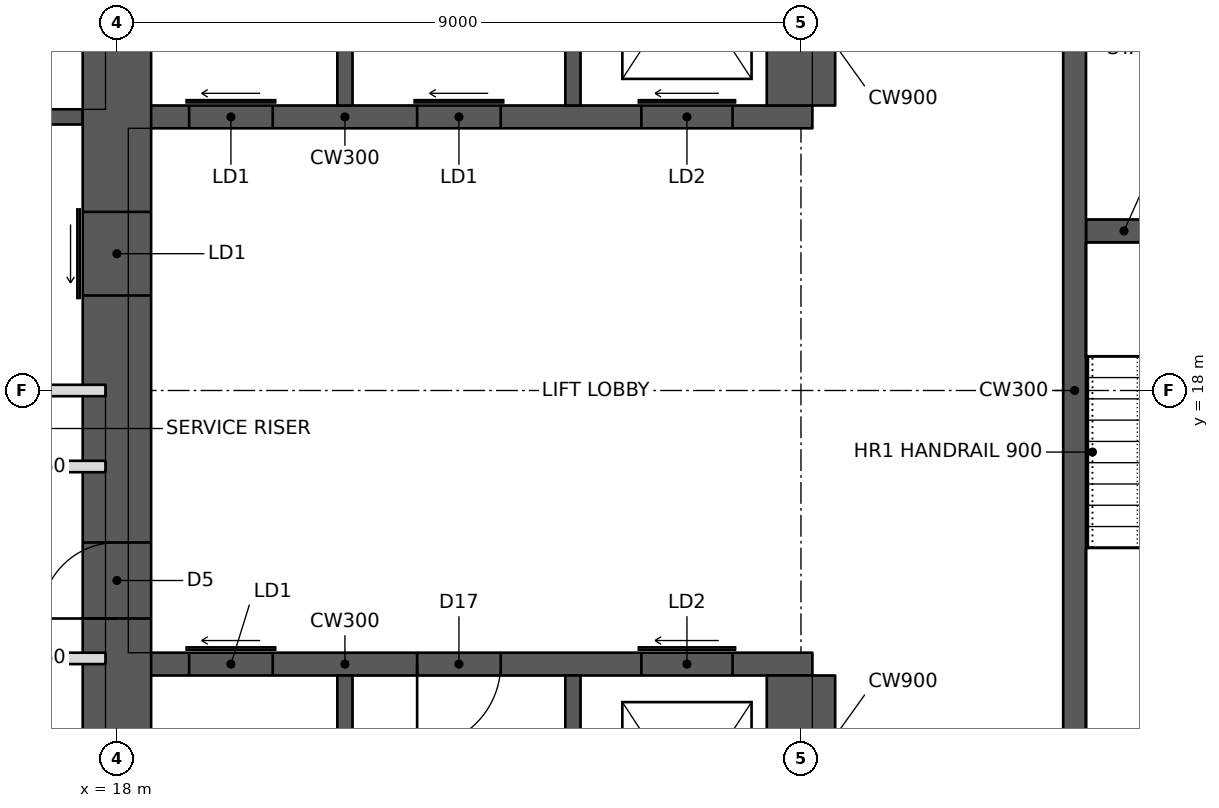
"""IFC4 building model, lengths in metres.
Left out: names, types, materials, properties, quantities, classifications, styles, units other than length and angle.
Written with IfcOpenShell. Run it as: python <this file> out.ifc"""

import sys

from ifc_helpers import new_model, si_unit, direction, frame, frame_2d, origin, place, context, subcontext, project, spatial, rectangle, extrude, element, fill, save


model = new_model("IFC4")
c1 = context("Model", 3, precision=1e-05, world=origin(), true_north=direction((0.0, 1.0)))
c2 = subcontext(c1, "Body", "Model", "MODEL_VIEW")
j1 = project(units=[si_unit("LENGTHUNIT", "METRE"), si_unit("PLANEANGLEUNIT", "RADIAN")], contexts=[c1])
p1 = place(None, origin())
s1 = spatial("IfcSite", under=j1, at=p1, CompositionType="ELEMENT")
p2 = place(p1, origin())
s2 = spatial("IfcBuilding", under=s1, at=p2, CompositionType="ELEMENT")
p3 = place(p2, frame((0.0, 0.0, 160.4)))
s3 = spatial("IfcBuildingStorey", under=s2, at=p3, CompositionType="ELEMENT", Elevation=160.4)
p4 = place(p3, frame((18.0, 11.4, 0.0), z_axis=(0.0, 0.0, 1.0), x_axis=(0.0, 1.0, 0.0)))
e1 = element("IfcWall", 1, at=p4, inside=s3, PredefinedType="SHEAR", context=c2, shape_type="SweptSolid", body=[
    extrude(rectangle(XDim=13.2, YDim=0.9, at=frame_2d((6.6, 0.0))), origin(), (0.0, 0.0, 1.0), 3.4),
])
p5 = place(p4, frame((3.6, 0.0, 0.0)))
e2 = element("IfcOpeningElement", 2, at=p5, cuts=e1, PredefinedType="OPENING", context=c2, shape_type="SweptSolid", body=[
    extrude(rectangle(XDim=1.0, YDim=2.1, at=frame_2d((0.5, 1.05))), frame((0.0, 0.46, 0.0), z_axis=(0.0, -1.0, 0.0), x_axis=(1.0, 0.0, 0.0)), (0.0, 0.0, 1.0), 0.92),
])
p6 = place(p4, frame((7.85, 0.0, 0.0)))
e3 = element("IfcOpeningElement", 3, at=p6, cuts=e1, PredefinedType="OPENING", context=c2, shape_type="SweptSolid", body=[
    extrude(rectangle(XDim=1.1, YDim=2.1, at=frame_2d((0.55, 1.05))), frame((0.0, 0.46, 0.0), z_axis=(0.0, -1.0, 0.0), x_axis=(1.0, 0.0, 0.0)), (0.0, 0.0, 1.0), 0.92),
])
p7 = place(p3, frame((14.55, 18.0, 0.0), z_axis=(0.0, 0.0, 1.0), x_axis=(1.0, 0.0, 0.0)))
e4 = element("IfcWall", 4, at=p7, inside=s3, PredefinedType="PARTITIONING", context=c2, shape_type="SweptSolid", body=[
    extrude(rectangle(XDim=3.3, YDim=0.15, at=frame_2d((1.65, 0.0))), origin(), (0.0, 0.0, 1.0), 3.2),
])
p8 = place(p3, frame((18.15, 14.4, 0.0), z_axis=(0.0, 0.0, 1.0), x_axis=(1.0, 0.0, 0.0)))
e5 = element("IfcWall", 5, at=p8, inside=s3, PredefinedType="SHEAR", context=c2, shape_type="SweptSolid", body=[
    extrude(rectangle(XDim=9.0, YDim=0.3, at=frame_2d((4.5, 0.0))), origin(), (0.0, 0.0, 1.0), 3.4),
])
p9 = place(p8, frame((0.8, 0.0, 0.0)))
e6 = element("IfcOpeningElement", 6, at=p9, cuts=e5, PredefinedType="OPENING", context=c2, shape_type="SweptSolid", body=[
    extrude(rectangle(XDim=1.1, YDim=2.1, at=frame_2d((0.55, 1.05))), frame((0.0, 0.16, 0.0), z_axis=(0.0, -1.0, 0.0), x_axis=(1.0, 0.0, 0.0)), (0.0, 0.0, 1.0), 0.32),
])
p10 = place(p8, frame((6.75, 0.0, 0.0)))
e7 = element("IfcOpeningElement", 7, at=p10, cuts=e5, PredefinedType="OPENING", context=c2, shape_type="SweptSolid", body=[
    extrude(rectangle(XDim=1.2, YDim=2.1, at=frame_2d((0.6, 1.05))), frame((0.0, 0.16, 0.0), z_axis=(0.0, -1.0, 0.0), x_axis=(1.0, 0.0, 0.0)), (0.0, 0.0, 1.0), 0.32),
])
p11 = place(p8, frame((3.8, 0.0, 0.0)))
e8 = element("IfcOpeningElement", 8, at=p11, cuts=e5, PredefinedType="OPENING", context=c2, shape_type="SweptSolid", body=[
    extrude(rectangle(XDim=1.1, YDim=2.1, at=frame_2d((0.55, 1.05))), frame((0.0, 0.16, 0.0), z_axis=(0.0, -1.0, 0.0), x_axis=(1.0, 0.0, 0.0)), (0.0, 0.0, 1.0), 0.32),
])
p12 = place(p3, frame((27.0, 11.4, 0.0), z_axis=(0.0, 0.0, 1.0), x_axis=(0.0, 1.0, 0.0)))
e9 = element("IfcWall", 9, at=p12, inside=s3, PredefinedType="SHEAR", context=c2, shape_type="SweptSolid", body=[
    extrude(rectangle(XDim=2.85, YDim=0.9, at=frame_2d((1.425, 0.0))), origin(), (0.0, 0.0, 1.0), 3.4),
])
for number, where, z_axis, x_axis in (
    (10, (21.0, 11.4, 0.0), (0.0, 0.0, 1.0), (0.0, 1.0, 0.0)),
    (11, (24.0, 11.4, 0.0), (0.0, 0.0, 1.0), (0.0, 1.0, 0.0)),
):
    element("IfcWall", number, at=place(p3, frame(where, z_axis=z_axis, x_axis=x_axis)), inside=s3, PredefinedType="SHEAR", context=c2, shape_type="SweptSolid", body=[
        extrude(rectangle(XDim=2.85, YDim=0.2, at=frame_2d((1.425, 0.0))), origin(), (0.0, 0.0, 1.0), 3.4),
    ])
p13 = place(p3, frame((18.15, 21.6, 0.0), z_axis=(0.0, 0.0, 1.0), x_axis=(1.0, 0.0, 0.0)))
e12 = element("IfcWall", 12, at=p13, inside=s3, PredefinedType="SHEAR", context=c2, shape_type="SweptSolid", body=[
    extrude(rectangle(XDim=9.0, YDim=0.3, at=frame_2d((4.5, 0.0))), origin(), (0.0, 0.0, 1.0), 3.4),
])
p14 = place(p13, frame((0.8, 0.0, 0.0)))
e13 = element("IfcOpeningElement", 13, at=p14, cuts=e12, PredefinedType="OPENING", context=c2, shape_type="SweptSolid", body=[
    extrude(rectangle(XDim=1.1, YDim=2.1, at=frame_2d((0.55, 1.05))), frame((0.0, 0.16, 0.0), z_axis=(0.0, -1.0, 0.0), x_axis=(1.0, 0.0, 0.0)), (0.0, 0.0, 1.0), 0.32),
])
p15 = place(p13, frame((3.8, 0.0, 0.0)))
e14 = element("IfcOpeningElement", 14, at=p15, cuts=e12, PredefinedType="OPENING", context=c2, shape_type="SweptSolid", body=[
    extrude(rectangle(XDim=1.1, YDim=2.1, at=frame_2d((0.55, 1.05))), frame((0.0, 0.16, 0.0), z_axis=(0.0, -1.0, 0.0), x_axis=(1.0, 0.0, 0.0)), (0.0, 0.0, 1.0), 0.32),
])
p16 = place(p13, frame((6.75, 0.0, 0.0)))
e15 = element("IfcOpeningElement", 15, at=p16, cuts=e12, PredefinedType="OPENING", context=c2, shape_type="SweptSolid", body=[
    extrude(rectangle(XDim=1.2, YDim=2.1, at=frame_2d((0.6, 1.05))), frame((0.0, 0.16, 0.0), z_axis=(0.0, -1.0, 0.0), x_axis=(1.0, 0.0, 0.0)), (0.0, 0.0, 1.0), 0.32),
])
p17 = place(p3, frame((27.0, 21.75, 0.0), z_axis=(0.0, 0.0, 1.0), x_axis=(0.0, 1.0, 0.0)))
e16 = element("IfcWall", 16, at=p17, inside=s3, PredefinedType="SHEAR", context=c2, shape_type="SweptSolid", body=[
    extrude(rectangle(XDim=2.85, YDim=0.9, at=frame_2d((1.425, 0.0))), origin(), (0.0, 0.0, 1.0), 3.4),
])
for number, where, z_axis, x_axis in (
    (17, (21.0, 21.75, 0.0), (0.0, 0.0, 1.0), (0.0, 1.0, 0.0)),
    (18, (24.0, 21.75, 0.0), (0.0, 0.0, 1.0), (0.0, 1.0, 0.0)),
):
    element("IfcWall", number, at=place(p3, frame(where, z_axis=z_axis, x_axis=x_axis)), inside=s3, PredefinedType="SHEAR", context=c2, shape_type="SweptSolid", body=[
        extrude(rectangle(XDim=2.85, YDim=0.2, at=frame_2d((1.425, 0.0))), origin(), (0.0, 0.0, 1.0), 3.4),
    ])
p18 = place(p3, frame((30.6, 11.4, 0.0), z_axis=(0.0, 0.0, 1.0), x_axis=(0.0, 1.0, 0.0)))
e19 = element("IfcWall", 19, at=p18, inside=s3, PredefinedType="SHEAR", context=c2, shape_type="SweptSolid", body=[
    extrude(rectangle(XDim=13.2, YDim=0.3, at=frame_2d((6.6, 0.0))), origin(), (0.0, 0.0, 1.0), 3.4),
])
p19 = place(p3, frame((30.75, 20.1, 0.0), z_axis=(0.0, 0.0, 1.0), x_axis=(1.0, 0.0, 0.0)))
e20 = element("IfcWall", 20, at=p19, inside=s3, PredefinedType="SHEAR", context=c2, shape_type="SweptSolid", body=[
    extrude(rectangle(XDim=2.85, YDim=0.3, at=frame_2d((1.425, 0.0))), origin(), (0.0, 0.0, 1.0), 3.4),
])
p20 = place(p19, frame((1.15, 0.0, 0.0)))
e21 = element("IfcOpeningElement", 21, at=p20, cuts=e20, PredefinedType="OPENING", context=c2, shape_type="SweptSolid", body=[
    extrude(rectangle(XDim=1.0, YDim=2.1, at=frame_2d((0.5, 1.05))), frame((0.0, 0.16, 0.0), z_axis=(0.0, -1.0, 0.0), x_axis=(1.0, 0.0, 0.0)), (0.0, 0.0, 1.0), 0.32),
])
p21 = place(p3, frame((14.55, 21.6, 0.0), z_axis=(0.0, 0.0, 1.0), x_axis=(1.0, 0.0, 0.0)))
e22 = element("IfcWall", 22, at=p21, inside=s3, PredefinedType="SHEAR", context=c2, shape_type="SweptSolid", body=[
    extrude(rectangle(XDim=3.0, YDim=0.2, at=frame_2d((1.5, 0.0))), origin(), (0.0, 0.0, 1.0), 3.4),
])
p22 = place(p3, frame((14.55, 17.0, 0.0), z_axis=(0.0, 0.0, 1.0), x_axis=(1.0, 0.0, 0.0)))
e23 = element("IfcWall", 23, at=p22, inside=s3, PredefinedType="PARTITIONING", context=c2, shape_type="SweptSolid", body=[
    extrude(rectangle(XDim=3.3, YDim=0.15, at=frame_2d((1.65, 0.0))), origin(), (0.0, 0.0, 1.0), 3.2),
])
p23 = place(p22, frame((0.3, 0.0, 0.0)))
e24 = element("IfcOpeningElement", 24, at=p23, cuts=e23, PredefinedType="OPENING", context=c2, shape_type="SweptSolid", body=[
    extrude(rectangle(XDim=1.0, YDim=2.1, at=frame_2d((0.5, 1.05))), frame((0.0, 0.085, 0.0), z_axis=(0.0, -1.0, 0.0), x_axis=(1.0, 0.0, 0.0)), (0.0, 0.0, 1.0), 0.17),
])
p24 = place(p3, frame((14.55, 14.475, 0.0), z_axis=(0.0, 0.0, 1.0), x_axis=(1.0, 0.0, 0.0)))
e25 = element("IfcWall", 25, at=p24, inside=s3, PredefinedType="PARTITIONING", context=c2, shape_type="SweptSolid", body=[
    extrude(rectangle(XDim=3.3, YDim=0.15, at=frame_2d((1.65, 0.0))), origin(), (0.0, 0.0, 1.0), 3.2),
])
p25 = place(p24, frame((0.3, 0.0, 0.0)))
e26 = element("IfcOpeningElement", 26, at=p25, cuts=e25, PredefinedType="OPENING", context=c2, shape_type="SweptSolid", body=[
    extrude(rectangle(XDim=1.0, YDim=2.1, at=frame_2d((0.5, 1.05))), frame((0.0, 0.085, 0.0), z_axis=(0.0, -1.0, 0.0), x_axis=(1.0, 0.0, 0.0)), (0.0, 0.0, 1.0), 0.17),
])
p26 = place(p5, origin())
e27 = element("IfcDoor", 27, at=p26, inside=s3, OperationType="SINGLE_SWING_LEFT", PredefinedType="DOOR", context=c2, shape_type="SweptSolid", body=[
    extrude(rectangle(XDim=1.0, YDim=2.1, at=frame_2d((0.5, 1.05))), frame((0.0, 0.025, 0.0), z_axis=(0.0, -1.0, 0.0), x_axis=(1.0, 0.0, 0.0)), (0.0, 0.0, 1.0), 0.05),
])
fill(e2, e27)
p27 = place(p9, origin())
e28 = element("IfcDoor", 28, at=p27, inside=s3, OperationType="SLIDING_TO_LEFT", PredefinedType="DOOR", context=c2, shape_type="SweptSolid", body=[
    extrude(rectangle(XDim=1.1, YDim=2.1, at=frame_2d((0.55, 1.05))), frame((0.0, 0.025, 0.0), z_axis=(0.0, -1.0, 0.0), x_axis=(1.0, 0.0, 0.0)), (0.0, 0.0, 1.0), 0.05),
])
fill(e6, e28)
p28 = place(p6, origin())
e29 = element("IfcDoor", 29, at=p28, inside=s3, OperationType="SLIDING_TO_LEFT", PredefinedType="DOOR", context=c2, shape_type="SweptSolid", body=[
    extrude(rectangle(XDim=1.1, YDim=2.1, at=frame_2d((0.55, 1.05))), frame((0.0, 0.025, 0.0), z_axis=(0.0, -1.0, 0.0), x_axis=(1.0, 0.0, 0.0)), (0.0, 0.0, 1.0), 0.05),
])
fill(e3, e29)
p29 = place(p14, origin())
e30 = element("IfcDoor", 30, at=p29, inside=s3, OperationType="SLIDING_TO_LEFT", PredefinedType="DOOR", context=c2, shape_type="SweptSolid", body=[
    extrude(rectangle(XDim=1.1, YDim=2.1, at=frame_2d((0.55, 1.05))), frame((0.0, 0.025, 0.0), z_axis=(0.0, -1.0, 0.0), x_axis=(1.0, 0.0, 0.0)), (0.0, 0.0, 1.0), 0.05),
])
fill(e13, e30)
p30 = place(p15, origin())
e31 = element("IfcDoor", 31, at=p30, inside=s3, OperationType="SLIDING_TO_LEFT", PredefinedType="DOOR", context=c2, shape_type="SweptSolid", body=[
    extrude(rectangle(XDim=1.1, YDim=2.1, at=frame_2d((0.55, 1.05))), frame((0.0, 0.025, 0.0), z_axis=(0.0, -1.0, 0.0), x_axis=(1.0, 0.0, 0.0)), (0.0, 0.0, 1.0), 0.05),
])
fill(e14, e31)
p31 = place(p10, origin())
e32 = element("IfcDoor", 32, at=p31, inside=s3, OperationType="SLIDING_TO_LEFT", PredefinedType="DOOR", context=c2, shape_type="SweptSolid", body=[
    extrude(rectangle(XDim=1.2, YDim=2.1, at=frame_2d((0.6, 1.05))), frame((0.0, 0.025, 0.0), z_axis=(0.0, -1.0, 0.0), x_axis=(1.0, 0.0, 0.0)), (0.0, 0.0, 1.0), 0.05),
])
fill(e7, e32)
p32 = place(p16, origin())
e33 = element("IfcDoor", 33, at=p32, inside=s3, OperationType="SLIDING_TO_LEFT", PredefinedType="DOOR", context=c2, shape_type="SweptSolid", body=[
    extrude(rectangle(XDim=1.2, YDim=2.1, at=frame_2d((0.6, 1.05))), frame((0.0, 0.025, 0.0), z_axis=(0.0, -1.0, 0.0), x_axis=(1.0, 0.0, 0.0)), (0.0, 0.0, 1.0), 0.05),
])
fill(e15, e33)
p33 = place(p11, frame((1.1, 0.0, 0.0), z_axis=(0.0, 0.0, 1.0), x_axis=(-1.0, 0.0, 0.0)))
e34 = element("IfcDoor", 34, at=p33, inside=s3, OperationType="SINGLE_SWING_RIGHT", PredefinedType="DOOR", context=c2, shape_type="SweptSolid", body=[
    extrude(rectangle(XDim=1.1, YDim=2.1, at=frame_2d((0.55, 1.05))), frame((0.0, 0.025, 0.0), z_axis=(0.0, -1.0, 0.0), x_axis=(1.0, 0.0, 0.0)), (0.0, 0.0, 1.0), 0.05),
])
fill(e8, e34)
save(model, sys.argv[1])
